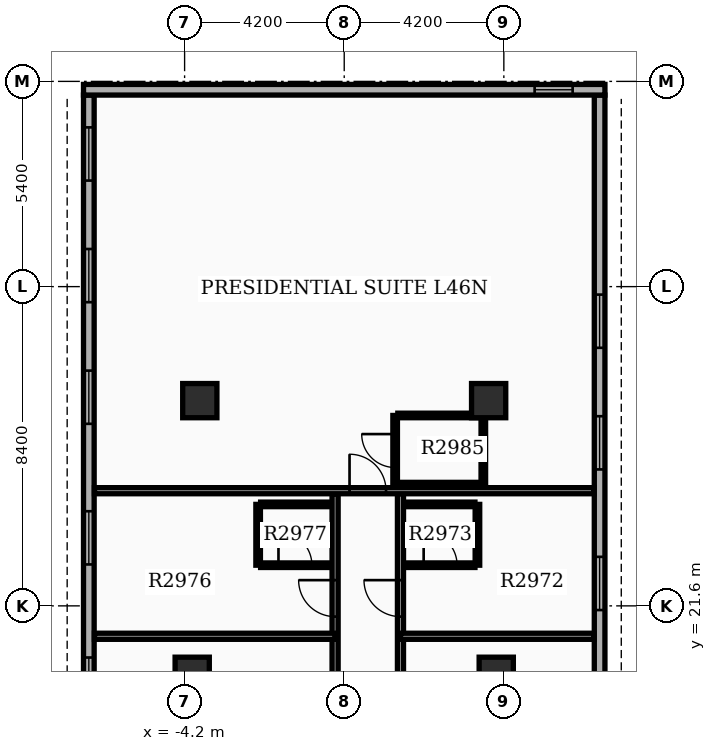
"""IFC4 building model, lengths in metres.
Left out: names, types, materials, properties, quantities, classifications, styles, units other than length and angle.
Written with IfcOpenShell. Run it as: python <this file> out.ifc"""

import sys

from ifc_helpers import new_model, si_unit, direction, frame, frame_2d, origin, origin_2d, place, context, subcontext, project, spatial, rectangle, extrude, element, fill, save


model = new_model("IFC4")
c1 = context("Model", 3, precision=1e-05, world=origin(), true_north=direction((0.0, 1.0)))
c2 = subcontext(c1, "Body", "Model", "MODEL_VIEW")
j1 = project(units=[si_unit("LENGTHUNIT", "METRE"), si_unit("PLANEANGLEUNIT", "RADIAN")], contexts=[c1])
p1 = place(None, origin())
s1 = spatial("IfcSite", under=j1, at=p1, CompositionType="ELEMENT")
p2 = place(p1, origin())
s2 = spatial("IfcBuilding", under=s1, at=p2, CompositionType="ELEMENT")
p3 = place(p2, frame((0.0, 0.0, 183.9)))
s3 = spatial("IfcBuildingStorey", under=s2, at=p3, CompositionType="ELEMENT", Elevation=183.9)
for number, where, z_axis, x_axis in (
    (1, (-4.0, 19.8, 0.0), (0.0, 0.0, 1.0), (1.0, 0.0, 0.0)),
    (2, (4.0, 19.8, 0.0), (0.0, 0.0, 1.0), (1.0, 0.0, 0.0)),
    (3, (-3.8, 27.0, 0.0), (0.0, 0.0, 1.0), (1.0, 0.0, 0.0)),
    (4, (3.8, 27.0, 0.0), (0.0, 0.0, 1.0), (1.0, 0.0, 0.0)),
):
    element("IfcColumn", number, at=place(p3, frame(where, z_axis=z_axis, x_axis=x_axis)), inside=s3, PredefinedType="COLUMN", context=c2, shape_type="SweptSolid", body=[
        extrude(rectangle(XDim=0.9, YDim=0.9, at=origin_2d()), origin(), (0.0, 0.0, 1.0), 3.9),
    ])
p4 = place(p3, frame((6.72, 14.94, 0.0), z_axis=(0.0, 0.0, 1.0), x_axis=(0.0, 1.0, 0.0)))
e5 = element("IfcWall", 5, at=p4, inside=s3, PredefinedType="STANDARD", context=c2, shape_type="SweptSolid", body=[
    extrude(rectangle(XDim=20.1, YDim=0.28, at=frame_2d((10.05, 0.0))), origin(), (0.0, 0.0, 1.0), 2.97),
])
p5 = place(p4, frame((0.85, 0.0, 0.8)))
e6 = element("IfcOpeningElement", 6, at=p5, cuts=e5, PredefinedType="OPENING", context=c2, shape_type="SweptSolid", body=[
    extrude(rectangle(XDim=1.4, YDim=1.6, at=frame_2d((0.7, 0.8))), frame((0.0, 0.15, 0.0), z_axis=(0.0, -1.0, 0.0), x_axis=(1.0, 0.0, 0.0)), (0.0, 0.0, 1.0), 0.3),
])
p6 = place(p4, frame((6.55, 0.0, 0.8)))
e7 = element("IfcOpeningElement", 7, at=p6, cuts=e5, PredefinedType="OPENING", context=c2, shape_type="SweptSolid", body=[
    extrude(rectangle(XDim=1.4, YDim=1.6, at=frame_2d((0.7, 0.8))), frame((0.0, 0.15, 0.0), z_axis=(0.0, -1.0, 0.0), x_axis=(1.0, 0.0, 0.0)), (0.0, 0.0, 1.0), 0.3),
])
p7 = place(p4, frame((10.25, 0.0, 0.8)))
e8 = element("IfcOpeningElement", 8, at=p7, cuts=e5, PredefinedType="OPENING", context=c2, shape_type="SweptSolid", body=[
    extrude(rectangle(XDim=1.4, YDim=1.6, at=frame_2d((0.7, 0.8))), frame((0.0, 0.15, 0.0), z_axis=(0.0, -1.0, 0.0), x_axis=(1.0, 0.0, 0.0)), (0.0, 0.0, 1.0), 0.3),
])
p8 = place(p4, frame((13.45, 0.0, 0.8)))
e9 = element("IfcOpeningElement", 9, at=p8, cuts=e5, PredefinedType="OPENING", context=c2, shape_type="SweptSolid", body=[
    extrude(rectangle(XDim=1.4, YDim=1.6, at=frame_2d((0.7, 0.8))), frame((0.0, 0.15, 0.0), z_axis=(0.0, -1.0, 0.0), x_axis=(1.0, 0.0, 0.0)), (0.0, 0.0, 1.0), 0.3),
])
p9 = place(p3, frame((-6.72, 35.04, 0.0), z_axis=(0.0, 0.0, 1.0), x_axis=(0.0, -1.0, 0.0)))
e10 = element("IfcWall", 10, at=p9, inside=s3, PredefinedType="STANDARD", context=c2, shape_type="SweptSolid", body=[
    extrude(rectangle(XDim=20.1, YDim=0.28, at=frame_2d((10.05, 0.0))), origin(), (0.0, 0.0, 1.0), 2.97),
])
p10 = place(p9, frame((0.85, 0.0, 0.8)))
e11 = element("IfcOpeningElement", 11, at=p10, cuts=e10, PredefinedType="OPENING", context=c2, shape_type="SweptSolid", body=[
    extrude(rectangle(XDim=1.4, YDim=1.6, at=frame_2d((0.7, 0.8))), frame((0.0, 0.15, 0.0), z_axis=(0.0, -1.0, 0.0), x_axis=(1.0, 0.0, 0.0)), (0.0, 0.0, 1.0), 0.3),
])
p11 = place(p9, frame((4.05, 0.0, 0.8)))
e12 = element("IfcOpeningElement", 12, at=p11, cuts=e10, PredefinedType="OPENING", context=c2, shape_type="SweptSolid", body=[
    extrude(rectangle(XDim=1.4, YDim=1.6, at=frame_2d((0.7, 0.8))), frame((0.0, 0.15, 0.0), z_axis=(0.0, -1.0, 0.0), x_axis=(1.0, 0.0, 0.0)), (0.0, 0.0, 1.0), 0.3),
])
p12 = place(p9, frame((7.25, 0.0, 0.8)))
e13 = element("IfcOpeningElement", 13, at=p12, cuts=e10, PredefinedType="OPENING", context=c2, shape_type="SweptSolid", body=[
    extrude(rectangle(XDim=1.4, YDim=1.6, at=frame_2d((0.7, 0.8))), frame((0.0, 0.15, 0.0), z_axis=(0.0, -1.0, 0.0), x_axis=(1.0, 0.0, 0.0)), (0.0, 0.0, 1.0), 0.3),
])
p13 = place(p9, frame((10.95, 0.0, 0.8)))
e14 = element("IfcOpeningElement", 14, at=p13, cuts=e10, PredefinedType="OPENING", context=c2, shape_type="SweptSolid", body=[
    extrude(rectangle(XDim=1.4, YDim=1.6, at=frame_2d((0.7, 0.8))), frame((0.0, 0.15, 0.0), z_axis=(0.0, -1.0, 0.0), x_axis=(1.0, 0.0, 0.0)), (0.0, 0.0, 1.0), 0.3),
])
p14 = place(p9, frame((14.799, 0.0, 0.85)))
e15 = element("IfcOpeningElement", 15, at=p14, cuts=e10, PredefinedType="OPENING", context=c2, shape_type="SweptSolid", body=[
    extrude(rectangle(XDim=1.2, YDim=1.6, at=frame_2d((0.6, 0.8))), frame((0.0, 0.15, 0.0), z_axis=(0.0, -1.0, 0.0), x_axis=(1.0, 0.0, 0.0)), (0.0, 0.0, 1.0), 0.3),
])
p15 = place(p3, frame((6.86, 35.18, 0.0), z_axis=(0.0, 0.0, 1.0), x_axis=(-1.0, 0.0, 0.0)))
e16 = element("IfcWall", 16, at=p15, inside=s3, PredefinedType="STANDARD", context=c2, shape_type="SweptSolid", body=[
    extrude(rectangle(XDim=13.72, YDim=0.28, at=frame_2d((6.86, 0.0))), origin(), (0.0, 0.0, 1.0), 2.97),
])
p16 = place(p15, frame((0.85, 0.0, 0.85)))
e17 = element("IfcOpeningElement", 17, at=p16, cuts=e16, PredefinedType="OPENING", context=c2, shape_type="SweptSolid", body=[
    extrude(rectangle(XDim=1.0, YDim=1.5, at=frame_2d((0.5, 0.75))), frame((0.0, 0.15, 0.0), z_axis=(0.0, -1.0, 0.0), x_axis=(1.0, 0.0, 0.0)), (0.0, 0.0, 1.0), 0.3),
])
p17 = place(p3, frame((1.48, 14.85, 0.0), z_axis=(0.0, 0.0, 1.0), x_axis=(0.0, 1.0, 0.0)))
e18 = element("IfcWall", 18, at=p17, inside=s3, PredefinedType="PARTITIONING", context=c2, shape_type="SweptSolid", body=[
    extrude(rectangle(XDim=9.7, YDim=0.16, at=frame_2d((4.85, 0.0))), origin(), (0.0, 0.0, 1.0), 2.96),
])
p18 = place(p17, frame((2.575, 0.0, 0.0)))
e19 = element("IfcOpeningElement", 19, at=p18, cuts=e18, PredefinedType="OPENING", context=c2, shape_type="SweptSolid", body=[
    extrude(rectangle(XDim=0.96, YDim=2.15, at=frame_2d((0.48, 1.075))), frame((0.0, 0.09, 0.0), z_axis=(0.0, -1.0, 0.0), x_axis=(1.0, 0.0, 0.0)), (0.0, 0.0, 1.0), 0.18),
])
p19 = place(p17, frame((6.467, 0.0, 0.0)))
e20 = element("IfcOpeningElement", 20, at=p19, cuts=e18, PredefinedType="OPENING", context=c2, shape_type="SweptSolid", body=[
    extrude(rectangle(XDim=0.96, YDim=2.15, at=frame_2d((0.48, 1.075))), frame((0.0, 0.09, 0.0), z_axis=(0.0, -1.0, 0.0), x_axis=(1.0, 0.0, 0.0)), (0.0, 0.0, 1.0), 0.18),
])
p20 = place(p3, frame((1.48, 20.8, 0.0), z_axis=(0.0, 0.0, 1.0), x_axis=(1.0, 0.0, 0.0)))
e21 = element("IfcWall", 21, at=p20, inside=s3, PredefinedType="PARTITIONING", context=c2, shape_type="SweptSolid", body=[
    extrude(rectangle(XDim=5.092, YDim=0.16, at=frame_2d((2.546, 0.0))), origin(), (0.0, 0.0, 1.0), 2.96),
])
p21 = place(p3, frame((1.62, 22.67, 0.0), z_axis=(0.0, 0.0, 1.0), x_axis=(1.0, 0.0, 0.0)))
e22 = element("IfcWall", 22, at=p21, inside=s3, PredefinedType="PARTITIONING", context=c2, shape_type="SweptSolid", body=[
    extrude(rectangle(XDim=1.82, YDim=0.12, at=frame_2d((0.91, 0.0))), origin(), (0.0, 0.0, 1.0), 2.96),
])
p22 = place(p21, frame((0.47, 0.0, 0.0)))
e23 = element("IfcOpeningElement", 23, at=p22, cuts=e22, PredefinedType="OPENING", context=c2, shape_type="SweptSolid", body=[
    extrude(rectangle(XDim=0.88, YDim=2.1, at=frame_2d((0.44, 1.05))), frame((0.0, 0.07, 0.0), z_axis=(0.0, -1.0, 0.0), x_axis=(1.0, 0.0, 0.0)), (0.0, 0.0, 1.0), 0.14),
])
p23 = place(p3, frame((1.62, 24.27, 0.0), z_axis=(0.0, 0.0, 1.0), x_axis=(1.0, 0.0, 0.0)))
e24 = element("IfcWall", 24, at=p23, inside=s3, PredefinedType="PARTITIONING", context=c2, shape_type="SweptSolid", body=[
    extrude(rectangle(XDim=1.82, YDim=0.12, at=frame_2d((0.91, 0.0))), origin(), (0.0, 0.0, 1.0), 2.96),
])
p24 = place(p3, frame((3.505, 22.67, 0.0), z_axis=(0.0, 0.0, 1.0), x_axis=(0.0, 1.0, 0.0)))
e25 = element("IfcWall", 25, at=p24, inside=s3, PredefinedType="PARTITIONING", context=c2, shape_type="SweptSolid", body=[
    extrude(rectangle(XDim=1.6, YDim=0.12, at=frame_2d((0.8, 0.0))), origin(), (0.0, 0.0, 1.0), 2.96),
])
p25 = place(p3, frame((-0.24, 14.85, 0.0), z_axis=(0.0, 0.0, 1.0), x_axis=(0.0, 1.0, 0.0)))
e26 = element("IfcWall", 26, at=p25, inside=s3, PredefinedType="PARTITIONING", context=c2, shape_type="SweptSolid", body=[
    extrude(rectangle(XDim=9.7, YDim=0.16, at=frame_2d((4.85, 0.0))), origin(), (0.0, 0.0, 1.0), 2.96),
])
p26 = place(p25, frame((2.575, 0.0, 0.0)))
e27 = element("IfcOpeningElement", 27, at=p26, cuts=e26, PredefinedType="OPENING", context=c2, shape_type="SweptSolid", body=[
    extrude(rectangle(XDim=0.96, YDim=2.15, at=frame_2d((0.48, 1.075))), frame((0.0, 0.09, 0.0), z_axis=(0.0, -1.0, 0.0), x_axis=(1.0, 0.0, 0.0)), (0.0, 0.0, 1.0), 0.18),
])
p27 = place(p25, frame((6.467, 0.0, 0.0)))
e28 = element("IfcOpeningElement", 28, at=p27, cuts=e26, PredefinedType="OPENING", context=c2, shape_type="SweptSolid", body=[
    extrude(rectangle(XDim=0.96, YDim=2.15, at=frame_2d((0.48, 1.075))), frame((0.0, 0.09, 0.0), z_axis=(0.0, -1.0, 0.0), x_axis=(1.0, 0.0, 0.0)), (0.0, 0.0, 1.0), 0.18),
])
p28 = place(p3, frame((-0.24, 20.8, 0.0), z_axis=(0.0, 0.0, 1.0), x_axis=(-1.0, 0.0, 0.0)))
e29 = element("IfcWall", 29, at=p28, inside=s3, PredefinedType="PARTITIONING", context=c2, shape_type="SweptSolid", body=[
    extrude(rectangle(XDim=6.332, YDim=0.16, at=frame_2d((3.166, 0.0))), origin(), (0.0, 0.0, 1.0), 2.96),
])
p29 = place(p3, frame((-2.2, 22.67, 0.0), z_axis=(0.0, 0.0, 1.0), x_axis=(1.0, 0.0, 0.0)))
e30 = element("IfcWall", 30, at=p29, inside=s3, PredefinedType="PARTITIONING", context=c2, shape_type="SweptSolid", body=[
    extrude(rectangle(XDim=1.82, YDim=0.12, at=frame_2d((0.91, 0.0))), origin(), (0.0, 0.0, 1.0), 2.96),
])
p30 = place(p29, frame((0.47, 0.0, 0.0)))
e31 = element("IfcOpeningElement", 31, at=p30, cuts=e30, PredefinedType="OPENING", context=c2, shape_type="SweptSolid", body=[
    extrude(rectangle(XDim=0.88, YDim=2.1, at=frame_2d((0.44, 1.05))), frame((0.0, 0.07, 0.0), z_axis=(0.0, -1.0, 0.0), x_axis=(1.0, 0.0, 0.0)), (0.0, 0.0, 1.0), 0.14),
])
p31 = place(p3, frame((-2.2, 24.27, 0.0), z_axis=(0.0, 0.0, 1.0), x_axis=(1.0, 0.0, 0.0)))
e32 = element("IfcWall", 32, at=p31, inside=s3, PredefinedType="PARTITIONING", context=c2, shape_type="SweptSolid", body=[
    extrude(rectangle(XDim=1.82, YDim=0.12, at=frame_2d((0.91, 0.0))), origin(), (0.0, 0.0, 1.0), 2.96),
])
p32 = place(p3, frame((-2.265, 22.67, 0.0), z_axis=(0.0, 0.0, 1.0), x_axis=(0.0, 1.0, 0.0)))
e33 = element("IfcWall", 33, at=p32, inside=s3, PredefinedType="PARTITIONING", context=c2, shape_type="SweptSolid", body=[
    extrude(rectangle(XDim=1.6, YDim=0.12, at=frame_2d((0.8, 0.0))), origin(), (0.0, 0.0, 1.0), 2.96),
])
p33 = place(p3, frame((-6.572, 24.63, 0.0), z_axis=(0.0, 0.0, 1.0), x_axis=(1.0, 0.0, 0.0)))
e34 = element("IfcWall", 34, at=p33, inside=s3, PredefinedType="PARTITIONING", context=c2, shape_type="SweptSolid", body=[
    extrude(rectangle(XDim=13.144, YDim=0.16, at=frame_2d((6.572, 0.0))), origin(), (0.0, 0.0, 1.0), 2.96),
])
p34 = place(p33, frame((6.712, 0.0, 0.0)))
e35 = element("IfcOpeningElement", 35, at=p34, cuts=e34, PredefinedType="OPENING", context=c2, shape_type="SweptSolid", body=[
    extrude(rectangle(XDim=0.96, YDim=2.15, at=frame_2d((0.48, 1.075))), frame((0.0, 0.09, 0.0), z_axis=(0.0, -1.0, 0.0), x_axis=(1.0, 0.0, 0.0)), (0.0, 0.0, 1.0), 0.18),
])
p35 = place(p3, frame((1.34, 24.79, 0.0), z_axis=(0.0, 0.0, 1.0), x_axis=(0.0, 1.0, 0.0)))
e36 = element("IfcWall", 36, at=p35, inside=s3, PredefinedType="PARTITIONING", context=c2, shape_type="SweptSolid", body=[
    extrude(rectangle(XDim=1.82, YDim=0.12, at=frame_2d((0.91, 0.0))), origin(), (0.0, 0.0, 1.0), 2.96),
])
p36 = place(p35, frame((0.45, 0.0, 0.0)))
e37 = element("IfcOpeningElement", 37, at=p36, cuts=e36, PredefinedType="OPENING", context=c2, shape_type="SweptSolid", body=[
    extrude(rectangle(XDim=0.88, YDim=2.1, at=frame_2d((0.44, 1.05))), frame((0.0, 0.07, 0.0), z_axis=(0.0, -1.0, 0.0), x_axis=(1.0, 0.0, 0.0)), (0.0, 0.0, 1.0), 0.14),
])
p37 = place(p3, frame((3.66, 24.79, 0.0), z_axis=(0.0, 0.0, 1.0), x_axis=(0.0, 1.0, 0.0)))
e38 = element("IfcWall", 38, at=p37, inside=s3, PredefinedType="PARTITIONING", context=c2, shape_type="SweptSolid", body=[
    extrude(rectangle(XDim=1.82, YDim=0.12, at=frame_2d((0.91, 0.0))), origin(), (0.0, 0.0, 1.0), 2.96),
])
for number, where, z_axis, x_axis in (
    (39, (1.41, 24.79, 0.0), (0.0, 0.0, 1.0), (1.0, 0.0, 0.0)),
    (40, (1.41, 26.61, 0.0), (0.0, 0.0, 1.0), (1.0, 0.0, 0.0)),
):
    element("IfcWall", number, at=place(p3, frame(where, z_axis=z_axis, x_axis=x_axis)), inside=s3, PredefinedType="PARTITIONING", context=c2, shape_type="SweptSolid", body=[
        extrude(rectangle(XDim=2.18, YDim=0.12, at=frame_2d((1.09, 0.0))), origin(), (0.0, 0.0, 1.0), 2.96),
    ])
p38 = place(p6, origin())
e41 = element("IfcWindow", 41, at=p38, inside=s3, PartitioningType="SINGLE_PANEL", PredefinedType="WINDOW", context=c2, shape_type="SweptSolid", body=[
    extrude(rectangle(XDim=1.4, YDim=1.6, at=frame_2d((0.7, 0.8))), frame((0.0, 0.03, 0.0), z_axis=(0.0, -1.0, 0.0), x_axis=(1.0, 0.0, 0.0)), (0.0, 0.0, 1.0), 0.06),
])
fill(e7, e41)
p39 = place(p7, origin())
e42 = element("IfcWindow", 42, at=p39, inside=s3, PartitioningType="SINGLE_PANEL", PredefinedType="WINDOW", context=c2, shape_type="SweptSolid", body=[
    extrude(rectangle(XDim=1.4, YDim=1.6, at=frame_2d((0.7, 0.8))), frame((0.0, 0.03, 0.0), z_axis=(0.0, -1.0, 0.0), x_axis=(1.0, 0.0, 0.0)), (0.0, 0.0, 1.0), 0.06),
])
fill(e8, e42)
p40 = place(p8, origin())
e43 = element("IfcWindow", 43, at=p40, inside=s3, PartitioningType="SINGLE_PANEL", PredefinedType="WINDOW", context=c2, shape_type="SweptSolid", body=[
    extrude(rectangle(XDim=1.4, YDim=1.6, at=frame_2d((0.7, 0.8))), frame((0.0, 0.03, 0.0), z_axis=(0.0, -1.0, 0.0), x_axis=(1.0, 0.0, 0.0)), (0.0, 0.0, 1.0), 0.06),
])
fill(e9, e43)
p41 = place(p10, origin())
e44 = element("IfcWindow", 44, at=p41, inside=s3, PartitioningType="SINGLE_PANEL", PredefinedType="WINDOW", context=c2, shape_type="SweptSolid", body=[
    extrude(rectangle(XDim=1.4, YDim=1.6, at=frame_2d((0.7, 0.8))), frame((0.0, 0.03, 0.0), z_axis=(0.0, -1.0, 0.0), x_axis=(1.0, 0.0, 0.0)), (0.0, 0.0, 1.0), 0.06),
])
fill(e11, e44)
p42 = place(p11, origin())
e45 = element("IfcWindow", 45, at=p42, inside=s3, PartitioningType="SINGLE_PANEL", PredefinedType="WINDOW", context=c2, shape_type="SweptSolid", body=[
    extrude(rectangle(XDim=1.4, YDim=1.6, at=frame_2d((0.7, 0.8))), frame((0.0, 0.03, 0.0), z_axis=(0.0, -1.0, 0.0), x_axis=(1.0, 0.0, 0.0)), (0.0, 0.0, 1.0), 0.06),
])
fill(e12, e45)
p43 = place(p12, origin())
e46 = element("IfcWindow", 46, at=p43, inside=s3, PartitioningType="SINGLE_PANEL", PredefinedType="WINDOW", context=c2, shape_type="SweptSolid", body=[
    extrude(rectangle(XDim=1.4, YDim=1.6, at=frame_2d((0.7, 0.8))), frame((0.0, 0.03, 0.0), z_axis=(0.0, -1.0, 0.0), x_axis=(1.0, 0.0, 0.0)), (0.0, 0.0, 1.0), 0.06),
])
fill(e13, e46)
p44 = place(p13, origin())
e47 = element("IfcWindow", 47, at=p44, inside=s3, PartitioningType="SINGLE_PANEL", PredefinedType="WINDOW", context=c2, shape_type="SweptSolid", body=[
    extrude(rectangle(XDim=1.4, YDim=1.6, at=frame_2d((0.7, 0.8))), frame((0.0, 0.03, 0.0), z_axis=(0.0, -1.0, 0.0), x_axis=(1.0, 0.0, 0.0)), (0.0, 0.0, 1.0), 0.06),
])
fill(e14, e47)
p45 = place(p16, origin())
e48 = element("IfcWindow", 48, at=p45, inside=s3, PartitioningType="SINGLE_PANEL", PredefinedType="WINDOW", context=c2, shape_type="SweptSolid", body=[
    extrude(rectangle(XDim=1.0, YDim=1.5, at=frame_2d((0.5, 0.75))), frame((0.0, 0.03, 0.0), z_axis=(0.0, -1.0, 0.0), x_axis=(1.0, 0.0, 0.0)), (0.0, 0.0, 1.0), 0.06),
])
fill(e17, e48)
p46 = place(p14, origin())
e49 = element("IfcWindow", 49, at=p46, inside=s3, PartitioningType="SINGLE_PANEL", PredefinedType="WINDOW", context=c2, shape_type="SweptSolid", body=[
    extrude(rectangle(XDim=1.2, YDim=1.6, at=frame_2d((0.6, 0.8))), frame((0.0, 0.03, 0.0), z_axis=(0.0, -1.0, 0.0), x_axis=(1.0, 0.0, 0.0)), (0.0, 0.0, 1.0), 0.06),
])
fill(e15, e49)
p47 = place(p19, origin())
e50 = element("IfcDoor", 50, at=p47, inside=s3, OperationType="SINGLE_SWING_RIGHT", PredefinedType="DOOR", context=c2, shape_type="SweptSolid", body=[
    extrude(rectangle(XDim=0.96, YDim=2.15, at=frame_2d((0.48, 1.075))), frame((0.0, 0.025, 0.0), z_axis=(0.0, -1.0, 0.0), x_axis=(1.0, 0.0, 0.0)), (0.0, 0.0, 1.0), 0.05),
])
fill(e20, e50)
p48 = place(p22, origin())
e51 = element("IfcDoor", 51, at=p48, inside=s3, OperationType="SINGLE_SWING_LEFT", PredefinedType="DOOR", context=c2, shape_type="SweptSolid", body=[
    extrude(rectangle(XDim=0.88, YDim=2.1, at=frame_2d((0.44, 1.05))), frame((0.0, 0.025, 0.0), z_axis=(0.0, -1.0, 0.0), x_axis=(1.0, 0.0, 0.0)), (0.0, 0.0, 1.0), 0.05),
])
fill(e23, e51)
p49 = place(p27, origin())
e52 = element("IfcDoor", 52, at=p49, inside=s3, OperationType="SINGLE_SWING_RIGHT", PredefinedType="DOOR", context=c2, shape_type="SweptSolid", body=[
    extrude(rectangle(XDim=0.96, YDim=2.15, at=frame_2d((0.48, 1.075))), frame((0.0, 0.025, 0.0), z_axis=(0.0, -1.0, 0.0), x_axis=(1.0, 0.0, 0.0)), (0.0, 0.0, 1.0), 0.05),
])
fill(e28, e52)
p50 = place(p30, origin())
e53 = element("IfcDoor", 53, at=p50, inside=s3, OperationType="SINGLE_SWING_LEFT", PredefinedType="DOOR", context=c2, shape_type="SweptSolid", body=[
    extrude(rectangle(XDim=0.88, YDim=2.1, at=frame_2d((0.44, 1.05))), frame((0.0, 0.025, 0.0), z_axis=(0.0, -1.0, 0.0), x_axis=(1.0, 0.0, 0.0)), (0.0, 0.0, 1.0), 0.05),
])
fill(e31, e53)
p51 = place(p34, origin())
e54 = element("IfcDoor", 54, at=p51, inside=s3, OperationType="SINGLE_SWING_LEFT", PredefinedType="DOOR", context=c2, shape_type="SweptSolid", body=[
    extrude(rectangle(XDim=0.96, YDim=2.15, at=frame_2d((0.48, 1.075))), frame((0.0, 0.025, 0.0), z_axis=(0.0, -1.0, 0.0), x_axis=(1.0, 0.0, 0.0)), (0.0, 0.0, 1.0), 0.05),
])
fill(e35, e54)
p52 = place(p36, origin())
e55 = element("IfcDoor", 55, at=p52, inside=s3, OperationType="SINGLE_SWING_RIGHT", PredefinedType="DOOR", context=c2, shape_type="SweptSolid", body=[
    extrude(rectangle(XDim=0.88, YDim=2.1, at=frame_2d((0.44, 1.05))), frame((0.0, 0.025, 0.0), z_axis=(0.0, -1.0, 0.0), x_axis=(1.0, 0.0, 0.0)), (0.0, 0.0, 1.0), 0.05),
])
fill(e37, e55)
save(model, sys.argv[1])
